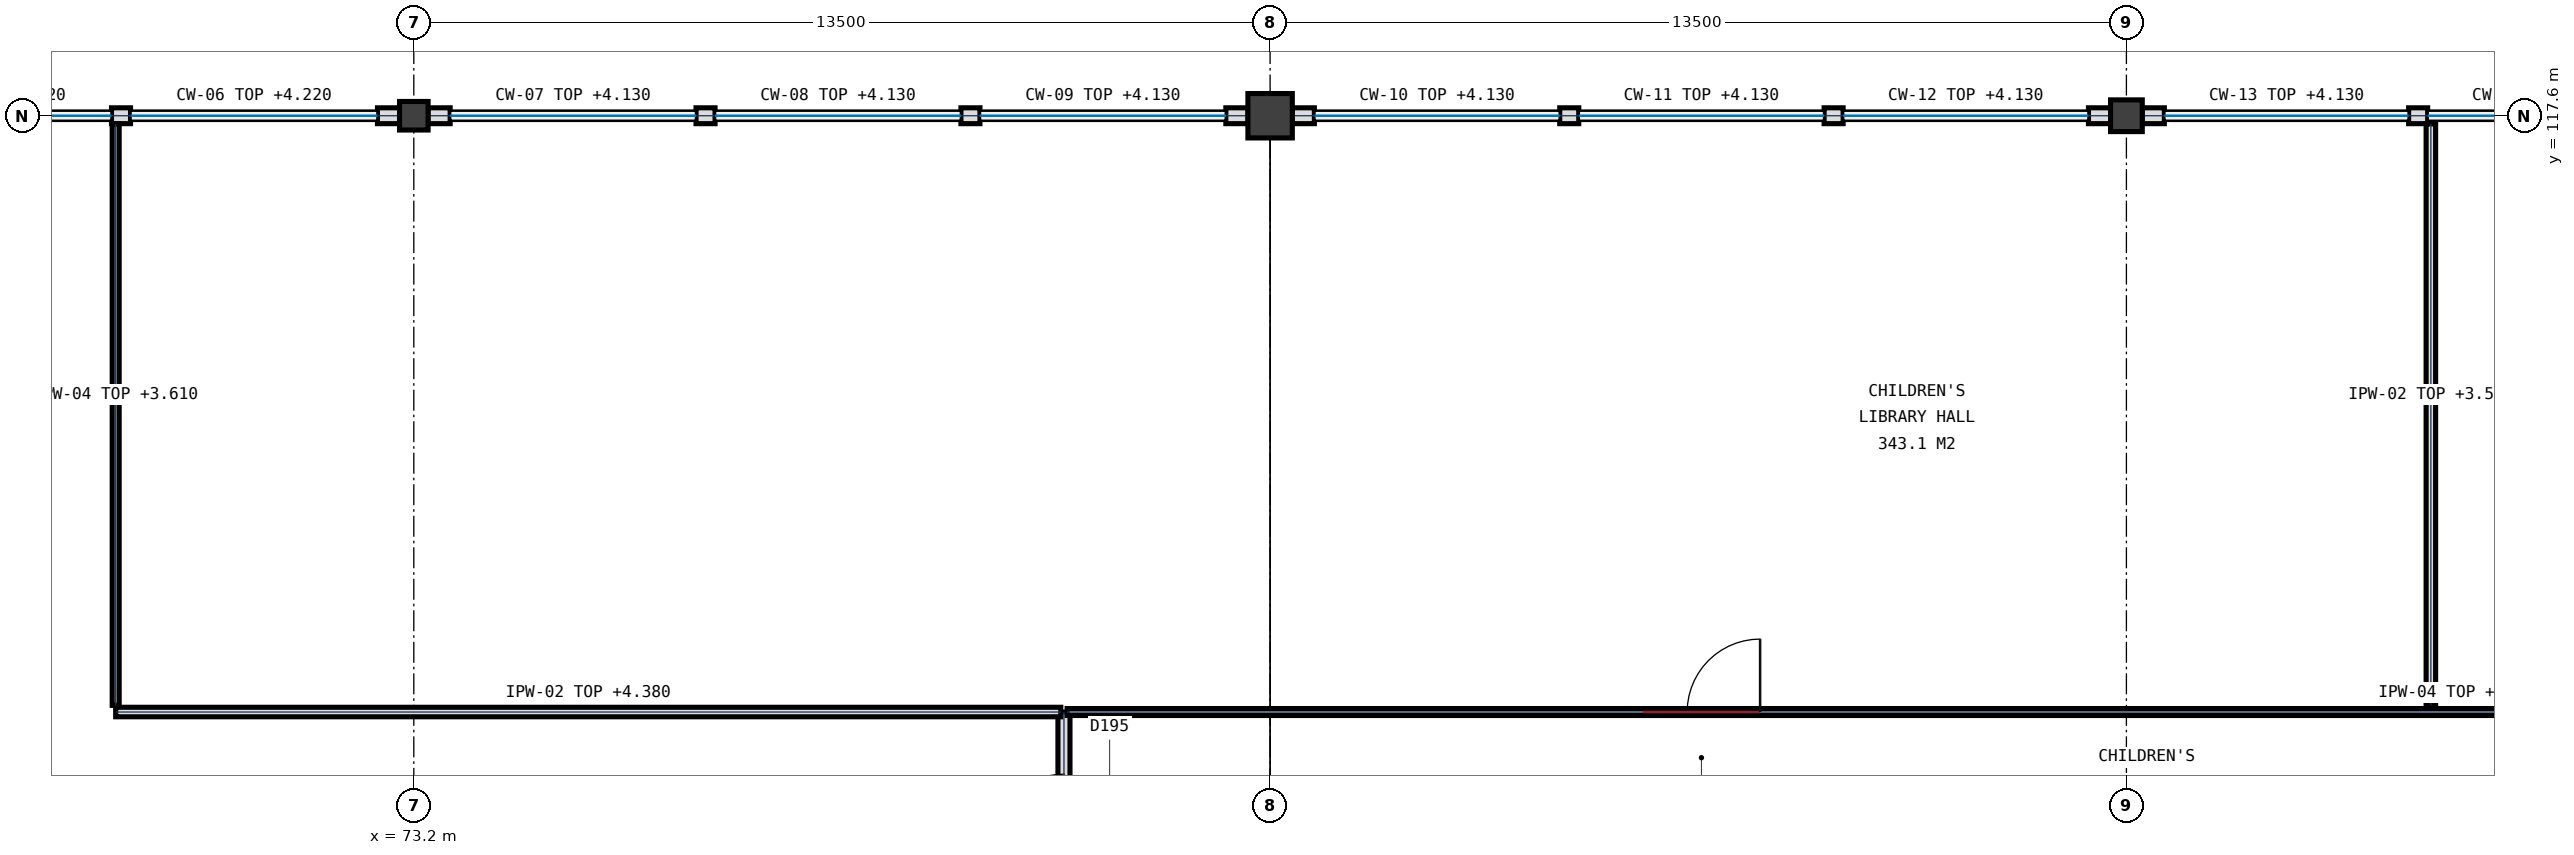
"""IFC4 building model, lengths in metres.
Left out: names, types, materials, properties, quantities, classifications, styles, units other than length and angle.
Written with IfcOpenShell. Run it as: python <this file> out.ifc"""

import sys

from ifc_helpers import new_model, si_unit, direction, frame, frame_2d, origin, origin_2d, place, context, subcontext, project, spatial, rectangle, circle, extrude, element, fill, save


model = new_model("IFC4")
c1 = context("Model", 3, precision=1e-05, world=origin(), true_north=direction((0.0, 1.0)))
c2 = subcontext(c1, "Body", "Model", "MODEL_VIEW")
j1 = project(units=[si_unit("LENGTHUNIT", "METRE"), si_unit("PLANEANGLEUNIT", "RADIAN")], contexts=[c1])
p1 = place(None, origin())
s1 = spatial("IfcSite", under=j1, at=p1, CompositionType="ELEMENT")
p2 = place(p1, origin())
s2 = spatial("IfcBuilding", under=s1, at=p2, CompositionType="ELEMENT")
p3 = place(p2, origin())
s3 = spatial("IfcBuildingStorey", under=s2, at=p3, CompositionType="ELEMENT", Elevation=0.0)
p4 = place(p3, frame((73.2, 117.6, 0.0), z_axis=(0.0, 0.0, 1.0), x_axis=(1.0, 0.0, 0.0)))
e1 = element("IfcColumn", 1, at=p4, inside=s3, PredefinedType="COLUMN", context=c2, shape_type="SweptSolid", body=[
    extrude(rectangle(XDim=0.45, YDim=0.45, at=origin_2d()), origin(), (0.0, 0.0, 1.0), 5.4),
])
p5 = place(p3, frame((86.7, 117.6, 0.0), z_axis=(0.0, 0.0, 1.0), x_axis=(1.0, 0.0, 0.0)))
e2 = element("IfcColumn", 2, at=p5, inside=s3, PredefinedType="COLUMN", context=c2, shape_type="SweptSolid", body=[
    extrude(circle(Radius=0.35, at=origin_2d()), origin(), (0.0, 0.0, 1.0), 5.4),
])
p6 = place(p3, frame((100.2, 117.6, 0.0), z_axis=(0.0, 0.0, 1.0), x_axis=(1.0, 0.0, 0.0)))
e3 = element("IfcColumn", 3, at=p6, inside=s3, PredefinedType="COLUMN", context=c2, shape_type="SweptSolid", body=[
    extrude(rectangle(XDim=0.5, YDim=0.5, at=origin_2d()), origin(), (0.0, 0.0, 1.0), 5.4),
])
p7 = place(p3, frame((72.627, 117.6, 0.0), z_axis=(0.0, 0.0, 1.0), x_axis=(1.0, 0.0, 0.0)))
e4 = element("IfcWall", 4, at=p7, inside=s3, PredefinedType="SOLIDWALL", context=c2, shape_type="SweptSolid", body=[
    extrude(rectangle(XDim=0.35, YDim=0.25, at=frame_2d((0.175, 0.0))), origin(), (0.0, 0.0, 1.0), 4.22),
])
p8 = place(p3, frame((68.434, 117.6, 0.0), z_axis=(0.0, 0.0, 1.0), x_axis=(1.0, 0.0, 0.0)))
e5 = element("IfcWall", 5, at=p8, inside=s3, PredefinedType="SOLIDWALL", context=c2, shape_type="SweptSolid", body=[
    extrude(rectangle(XDim=0.3, YDim=0.25, at=frame_2d((0.15, 0.0))), origin(), (0.0, 0.0, 1.0), 4.22),
])
p9 = place(p3, frame((73.423, 117.6, 0.0), z_axis=(0.0, 0.0, 1.0), x_axis=(1.0, 0.0, 0.0)))
e6 = element("IfcWall", 6, at=p9, inside=s3, PredefinedType="SOLIDWALL", context=c2, shape_type="SweptSolid", body=[
    extrude(rectangle(XDim=0.35, YDim=0.25, at=frame_2d((0.175, 0.0))), origin(), (0.0, 0.0, 1.0), 4.13),
])
p10 = place(p3, frame((86.002, 117.6, 0.0), z_axis=(0.0, 0.0, 1.0), x_axis=(1.0, 0.0, 0.0)))
e7 = element("IfcWall", 7, at=p10, inside=s3, PredefinedType="SOLIDWALL", context=c2, shape_type="SweptSolid", body=[
    extrude(rectangle(XDim=0.35, YDim=0.25, at=frame_2d((0.175, 0.0))), origin(), (0.0, 0.0, 1.0), 4.13),
])
p11 = place(p3, frame((77.649, 117.6, 0.0), z_axis=(0.0, 0.0, 1.0), x_axis=(1.0, 0.0, 0.0)))
e8 = element("IfcWall", 8, at=p11, inside=s3, PredefinedType="SOLIDWALL", context=c2, shape_type="SweptSolid", body=[
    extrude(rectangle(XDim=0.3, YDim=0.25, at=frame_2d((0.15, 0.0))), origin(), (0.0, 0.0, 1.0), 4.13),
])
p12 = place(p3, frame((81.826, 117.6, 0.0), z_axis=(0.0, 0.0, 1.0), x_axis=(1.0, 0.0, 0.0)))
e9 = element("IfcWall", 9, at=p12, inside=s3, PredefinedType="SOLIDWALL", context=c2, shape_type="SweptSolid", body=[
    extrude(rectangle(XDim=0.3, YDim=0.25, at=frame_2d((0.15, 0.0))), origin(), (0.0, 0.0, 1.0), 4.13),
])
for number, where, z_axis, x_axis in (
    (10, (87.048, 117.6, 0.0), (0.0, 0.0, 1.0), (1.0, 0.0, 0.0)),
    (11, (99.602, 117.6, 0.0), (0.0, 0.0, 1.0), (1.0, 0.0, 0.0)),
):
    element("IfcWall", number, at=place(p3, frame(where, z_axis=z_axis, x_axis=x_axis)), inside=s3, PredefinedType="SOLIDWALL", context=c2, shape_type="SweptSolid", body=[
        extrude(rectangle(XDim=0.35, YDim=0.25, at=frame_2d((0.175, 0.0))), origin(), (0.0, 0.0, 1.0), 4.13),
    ])
for number, where, z_axis, x_axis in (
    (12, (91.266, 117.6, 0.0), (0.0, 0.0, 1.0), (1.0, 0.0, 0.0)),
    (13, (95.434, 117.6, 0.0), (0.0, 0.0, 1.0), (1.0, 0.0, 0.0)),
):
    element("IfcWall", number, at=place(p3, frame(where, z_axis=z_axis, x_axis=x_axis)), inside=s3, PredefinedType="SOLIDWALL", context=c2, shape_type="SweptSolid", body=[
        extrude(rectangle(XDim=0.3, YDim=0.25, at=frame_2d((0.15, 0.0))), origin(), (0.0, 0.0, 1.0), 4.13),
    ])
p13 = place(p3, frame((100.448, 117.6, 0.0), z_axis=(0.0, 0.0, 1.0), x_axis=(1.0, 0.0, 0.0)))
e14 = element("IfcWall", 14, at=p13, inside=s3, PredefinedType="SOLIDWALL", context=c2, shape_type="SweptSolid", body=[
    extrude(rectangle(XDim=0.35, YDim=0.25, at=frame_2d((0.175, 0.0))), origin(), (0.0, 0.0, 1.0), 4.13),
])
p14 = place(p3, frame((104.649, 117.6, 0.0), z_axis=(0.0, 0.0, 1.0), x_axis=(1.0, 0.0, 0.0)))
e15 = element("IfcWall", 15, at=p14, inside=s3, PredefinedType="SOLIDWALL", context=c2, shape_type="SweptSolid", body=[
    extrude(rectangle(XDim=0.3, YDim=0.25, at=frame_2d((0.15, 0.0))), origin(), (0.0, 0.0, 1.0), 4.13),
])
p15 = place(p3, frame((83.45, 105.203, 0.0), z_axis=(0.0, 0.0, 1.0), x_axis=(0.0, 1.0, 0.0)))
e16 = element("IfcWall", 16, at=p15, inside=s3, PredefinedType="PARTITIONING", context=c2, shape_type="SweptSolid", body=[
    extrude(rectangle(XDim=2.997, YDim=0.19, at=frame_2d((1.499, 0.0))), origin(), (0.0, 0.0, 1.0), 5.14),
])
p16 = place(p15, frame((0.817, 0.0, 0.0)))
e17 = element("IfcOpeningElement", 17, at=p16, cuts=e16, PredefinedType="OPENING", context=c2, shape_type="SweptSolid", body=[
    extrude(rectangle(XDim=1.2, YDim=2.2, at=frame_2d((0.6, 1.1))), frame((0.0, 0.105, 0.0), z_axis=(0.0, -1.0, 0.0), x_axis=(1.0, 0.0, 0.0)), (0.0, 0.0, 1.0), 0.21),
])
p17 = place(p3, frame((68.5, 108.2, 0.0), z_axis=(0.0, 0.0, 1.0), x_axis=(1.0, 0.0, 0.0)))
e18 = element("IfcWall", 18, at=p17, inside=s3, PredefinedType="PARTITIONING", context=c2, shape_type="SweptSolid", body=[
    extrude(rectangle(XDim=14.9, YDim=0.15, at=frame_2d((7.45, 0.0))), origin(), (0.0, 0.0, 1.0), 4.38),
])
p18 = place(p3, frame((83.5, 108.2, 0.0), z_axis=(0.0, 0.0, 1.0), x_axis=(1.0, 0.0, 0.0)))
e19 = element("IfcWall", 19, at=p18, inside=s3, PredefinedType="PARTITIONING", context=c2, shape_type="SweptSolid", body=[
    extrude(rectangle(XDim=50.817, YDim=0.11, at=frame_2d((25.408, 0.0))), origin(), (0.0, 0.0, 1.0), 3.643),
])
p19 = place(p18, frame((9.075, 0.0, 0.0)))
e20 = element("IfcOpeningElement", 20, at=p19, cuts=e19, PredefinedType="OPENING", context=c2, shape_type="SweptSolid", body=[
    extrude(rectangle(XDim=1.85, YDim=2.35, at=frame_2d((0.925, 1.175))), frame((0.0, 0.065, 0.0), z_axis=(0.0, -1.0, 0.0), x_axis=(1.0, 0.0, 0.0)), (0.0, 0.0, 1.0), 0.13),
])
p20 = place(p18, frame((34.0, 0.0, 0.0)))
e21 = element("IfcOpeningElement", 21, at=p20, cuts=e19, PredefinedType="OPENING", context=c2, shape_type="SweptSolid", body=[
    extrude(rectangle(XDim=1.0, YDim=2.2, at=frame_2d((0.5, 1.1))), frame((0.0, 0.065, 0.0), z_axis=(0.0, -1.0, 0.0), x_axis=(1.0, 0.0, 0.0)), (0.0, 0.0, 1.0), 0.13),
])
p21 = place(p3, frame((68.5, 108.305, 0.0), z_axis=(0.0, 0.0, 1.0), x_axis=(0.0, 1.0, 0.0)))
e22 = element("IfcWall", 22, at=p21, inside=s3, PredefinedType="PARTITIONING", context=c2, shape_type="SweptSolid", body=[
    extrude(rectangle(XDim=9.166, YDim=0.11, at=frame_2d((4.583, 0.0))), origin(), (0.0, 0.0, 1.0), 3.61),
])
p22 = place(p3, frame((105.0, 108.305, 0.0), z_axis=(0.0, 0.0, 1.0), x_axis=(0.0, 1.0, 0.0)))
e23 = element("IfcWall", 23, at=p22, inside=s3, PredefinedType="PARTITIONING", context=c2, shape_type="SweptSolid", body=[
    extrude(rectangle(XDim=9.166, YDim=0.15, at=frame_2d((4.583, 0.0))), origin(), (0.0, 0.0, 1.0), 3.52),
])
p23 = place(p19, origin())
e24 = element("IfcDoor", 24, at=p23, inside=s3, OperationType="SINGLE_SWING_RIGHT", PredefinedType="DOOR", context=c2, shape_type="SweptSolid", body=[
    extrude(rectangle(XDim=1.85, YDim=2.35, at=frame_2d((0.925, 1.175))), frame((0.0, 0.032, 0.0), z_axis=(0.0, -1.0, 0.0), x_axis=(1.0, 0.0, 0.0)), (0.0, 0.0, 1.0), 0.065),
])
fill(e20, e24)
p24 = place(p16, origin())
e25 = element("IfcDoor", 25, at=p24, inside=s3, OperationType="SINGLE_SWING_LEFT", PredefinedType="DOOR", context=c2, shape_type="SweptSolid", body=[
    extrude(rectangle(XDim=1.2, YDim=2.2, at=frame_2d((0.6, 1.1))), frame((0.0, 0.032, 0.0), z_axis=(0.0, -1.0, 0.0), x_axis=(1.0, 0.0, 0.0)), (0.0, 0.0, 1.0), 0.065),
])
fill(e17, e25)
save(model, sys.argv[1])
